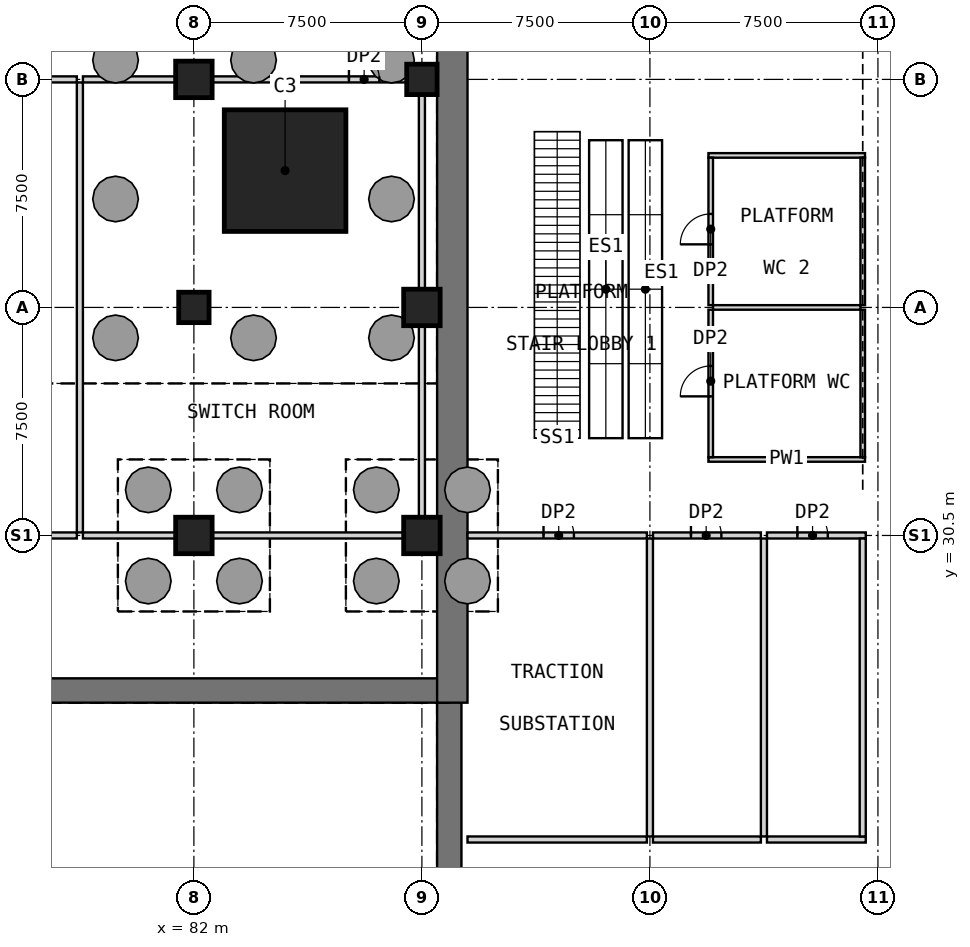
"""IFC4 building model, lengths in metres.
Left out: names, types, materials, properties, quantities, classifications, styles, units other than length and angle.
Written with IfcOpenShell. Run it as: python <this file> out.ifc"""

import sys

from ifc_helpers import new_model, si_unit, direction, frame, frame_2d, origin, origin_2d, place, context, subcontext, project, spatial, rectangle, extrude, element, fill, save


model = new_model("IFC4")
c1 = context("Model", 3, precision=1e-05, world=origin(), true_north=direction((0.0, 1.0)))
c2 = subcontext(c1, "Body", "Model", "MODEL_VIEW")
j1 = project(units=[si_unit("LENGTHUNIT", "METRE"), si_unit("PLANEANGLEUNIT", "RADIAN")], contexts=[c1])
p1 = place(None, origin())
s1 = spatial("IfcSite", under=j1, at=p1, CompositionType="ELEMENT")
p2 = place(p1, origin())
s2 = spatial("IfcBuilding", under=s1, at=p2, CompositionType="ELEMENT")
p3 = place(p2, frame((0.0, 0.0, -12.0)))
s3 = spatial("IfcBuildingStorey", under=s2, at=p3, CompositionType="ELEMENT", Elevation=-12.0)
p4 = place(p3, frame((90.4, 18.4, -0.6), z_axis=(0.0, 0.0, 1.0), x_axis=(0.0, 1.0, 0.0)))
e1 = element("IfcWall", 1, at=p4, inside=s3, PredefinedType="SHEAR", context=c2, shape_type="SweptSolid", body=[
    extrude(rectangle(XDim=7.0, YDim=0.8, at=frame_2d((3.5, 0.0))), origin(), (0.0, 0.0, 1.0), 6.6),
])
p5 = place(p3, frame((90.4, 25.4, -0.6), z_axis=(0.0, 0.0, 1.0), x_axis=(-1.0, 0.0, 0.0)))
e2 = element("IfcWall", 2, at=p5, inside=s3, PredefinedType="SHEAR", context=c2, shape_type="SweptSolid", body=[
    extrude(rectangle(XDim=80.0, YDim=0.8, at=frame_2d((40.0, 0.0))), origin(), (0.0, 0.0, 1.0), 6.6),
])
p6 = place(p3, frame((90.5, 25.0, 0.0), z_axis=(0.0, 0.0, 1.0), x_axis=(0.0, 1.0, 0.0)))
e3 = element("IfcWall", 3, at=p6, inside=s3, PredefinedType="SHEAR", context=c2, shape_type="SweptSolid", body=[
    extrude(rectangle(XDim=92.5, YDim=1.0, at=frame_2d((46.25, 0.0))), origin(), (0.0, 0.0, 1.0), 5.4),
])
p7 = place(p6, frame((23.15, 0.0, 0.0)))
e4 = element("IfcOpeningElement", 4, at=p7, cuts=e3, PredefinedType="OPENING", context=c2, shape_type="SweptSolid", body=[
    extrude(rectangle(XDim=1.5, YDim=2.1, at=frame_2d((0.75, 1.05))), frame((0.0, 0.51, 0.0), z_axis=(0.0, -1.0, 0.0), x_axis=(1.0, 0.0, 0.0)), (0.0, 0.0, 1.0), 1.02),
])
p8 = place(p6, frame((67.75, 0.0, 0.0)))
e5 = element("IfcOpeningElement", 5, at=p8, cuts=e3, PredefinedType="OPENING", context=c2, shape_type="SweptSolid", body=[
    extrude(rectangle(XDim=1.5, YDim=2.1, at=frame_2d((0.75, 1.05))), frame((0.0, 0.51, 0.0), z_axis=(0.0, -1.0, 0.0), x_axis=(1.0, 0.0, 0.0)), (0.0, 0.0, 1.0), 1.02),
])
p9 = place(p3, frame((82.0, 38.0, 0.0), z_axis=(0.0, 0.0, 1.0), x_axis=(1.0, 0.0, 0.0)))
e6 = element("IfcColumn", 6, at=p9, inside=s3, PredefinedType="COLUMN", context=c2, shape_type="SweptSolid", body=[
    extrude(rectangle(XDim=1.0, YDim=1.0, at=origin_2d()), origin(), (0.0, 0.0, 1.0), 6.0),
])
p10 = place(p3, frame((82.0, 45.5, 0.0), z_axis=(0.0, 0.0, 1.0), x_axis=(1.0, 0.0, 0.0)))
e7 = element("IfcColumn", 7, at=p10, inside=s3, PredefinedType="COLUMN", context=c2, shape_type="SweptSolid", body=[
    extrude(rectangle(XDim=1.2, YDim=1.2, at=origin_2d()), origin(), (0.0, 0.0, 1.0), 6.0),
])
p11 = place(p3, frame((89.5, 45.5, 0.0), z_axis=(0.0, 0.0, 1.0), x_axis=(1.0, 0.0, 0.0)))
e8 = element("IfcColumn", 8, at=p11, inside=s3, PredefinedType="COLUMN", context=c2, shape_type="SweptSolid", body=[
    extrude(rectangle(XDim=1.0, YDim=1.0, at=origin_2d()), origin(), (0.0, 0.0, 1.0), 6.0),
])
p12 = place(p3, frame((85.0, 42.5, 0.0), z_axis=(0.0, 0.0, 1.0), x_axis=(1.0, 0.0, 0.0)))
e9 = element("IfcColumn", 9, at=p12, inside=s3, PredefinedType="COLUMN", context=c2, shape_type="SweptSolid", body=[
    extrude(rectangle(XDim=4.0, YDim=4.0, at=origin_2d()), origin(), (0.0, 0.0, 1.0), 6.0),
])
for number, where, z_axis, x_axis in (
    (10, (82.0, 30.5, 0.0), (0.0, 0.0, 1.0), (1.0, 0.0, 0.0)),
    (11, (89.5, 30.5, 0.0), (0.0, 0.0, 1.0), (1.0, 0.0, 0.0)),
    (12, (89.5, 38.0, 0.0), (0.0, 0.0, 1.0), (1.0, 0.0, 0.0)),
):
    element("IfcColumn", number, at=place(p3, frame(where, z_axis=z_axis, x_axis=x_axis)), inside=s3, PredefinedType="COLUMN", context=c2, shape_type="SweptSolid", body=[
        extrude(rectangle(XDim=1.2, YDim=1.2, at=origin_2d()), origin(), (0.0, 0.0, 1.0), 6.0),
    ])
for number, where, z_axis, x_axis in (
    (13, (75.1, 45.5, 0.0), (0.0, 0.0, 1.0), (1.0, 0.0, 0.0)),
    (14, (78.35, 45.5, 0.0), (0.0, 0.0, 1.0), (1.0, 0.0, 0.0)),
):
    element("IfcWall", number, at=place(p3, frame(where, z_axis=z_axis, x_axis=x_axis)), inside=s3, PredefinedType="PARTITIONING", context=c2, shape_type="SweptSolid", body=[
        extrude(rectangle(XDim=3.05, YDim=0.2, at=frame_2d((1.525, 0.0))), origin(), (0.0, 0.0, 1.0), 5.4),
    ])
p13 = place(p3, frame((82.6, 45.5, 0.0), z_axis=(0.0, 0.0, 1.0), x_axis=(1.0, 0.0, 0.0)))
e15 = element("IfcWall", 15, at=p13, inside=s3, PredefinedType="PARTITIONING", context=c2, shape_type="SweptSolid", body=[
    extrude(rectangle(XDim=6.4, YDim=0.2, at=frame_2d((3.2, 0.0))), origin(), (0.0, 0.0, 1.0), 5.4),
])
p14 = place(p13, frame((4.5, 0.0, 0.0)))
e16 = element("IfcOpeningElement", 16, at=p14, cuts=e15, PredefinedType="OPENING", context=c2, shape_type="SweptSolid", body=[
    extrude(rectangle(XDim=1.0, YDim=2.1, at=frame_2d((0.5, 1.05))), frame((0.0, 0.11, 0.0), z_axis=(0.0, -1.0, 0.0), x_axis=(1.0, 0.0, 0.0)), (0.0, 0.0, 1.0), 0.22),
])
for number, where, z_axis, x_axis in (
    (17, (75.1, 30.5, 0.0), (0.0, 0.0, 1.0), (1.0, 0.0, 0.0)),
    (18, (78.35, 30.5, 0.0), (0.0, 0.0, 1.0), (1.0, 0.0, 0.0)),
):
    element("IfcWall", number, at=place(p3, frame(where, z_axis=z_axis, x_axis=x_axis)), inside=s3, PredefinedType="PARTITIONING", context=c2, shape_type="SweptSolid", body=[
        extrude(rectangle(XDim=3.05, YDim=0.2, at=frame_2d((1.525, 0.0))), origin(), (0.0, 0.0, 1.0), 5.4),
    ])
p15 = place(p3, frame((82.6, 30.5, 0.0), z_axis=(0.0, 0.0, 1.0), x_axis=(1.0, 0.0, 0.0)))
e19 = element("IfcWall", 19, at=p15, inside=s3, PredefinedType="PARTITIONING", context=c2, shape_type="SweptSolid", body=[
    extrude(rectangle(XDim=6.3, YDim=0.2, at=frame_2d((3.15, 0.0))), origin(), (0.0, 0.0, 1.0), 5.4),
])
p16 = place(p3, frame((91.0, 30.5, 0.0), z_axis=(0.0, 0.0, 1.0), x_axis=(1.0, 0.0, 0.0)))
e20 = element("IfcWall", 20, at=p16, inside=s3, PredefinedType="PARTITIONING", context=c2, shape_type="SweptSolid", body=[
    extrude(rectangle(XDim=5.9, YDim=0.2, at=frame_2d((2.95, 0.0))), origin(), (0.0, 0.0, 1.0), 5.4),
])
p17 = place(p16, frame((2.5, 0.0, 0.0)))
e21 = element("IfcOpeningElement", 21, at=p17, cuts=e20, PredefinedType="OPENING", context=c2, shape_type="SweptSolid", body=[
    extrude(rectangle(XDim=1.0, YDim=2.1, at=frame_2d((0.5, 1.05))), frame((0.0, 0.11, 0.0), z_axis=(0.0, -1.0, 0.0), x_axis=(1.0, 0.0, 0.0)), (0.0, 0.0, 1.0), 0.22),
])
p18 = place(p3, frame((97.1, 30.5, 0.0), z_axis=(0.0, 0.0, 1.0), x_axis=(1.0, 0.0, 0.0)))
e22 = element("IfcWall", 22, at=p18, inside=s3, PredefinedType="PARTITIONING", context=c2, shape_type="SweptSolid", body=[
    extrude(rectangle(XDim=3.55, YDim=0.2, at=frame_2d((1.775, 0.0))), origin(), (0.0, 0.0, 1.0), 5.4),
])
p19 = place(p18, frame((1.25, 0.0, 0.0)))
e23 = element("IfcOpeningElement", 23, at=p19, cuts=e22, PredefinedType="OPENING", context=c2, shape_type="SweptSolid", body=[
    extrude(rectangle(XDim=1.0, YDim=2.1, at=frame_2d((0.5, 1.05))), frame((0.0, 0.11, 0.0), z_axis=(0.0, -1.0, 0.0), x_axis=(1.0, 0.0, 0.0)), (0.0, 0.0, 1.0), 0.22),
])
p20 = place(p3, frame((100.85, 30.5, 0.0), z_axis=(0.0, 0.0, 1.0), x_axis=(1.0, 0.0, 0.0)))
e24 = element("IfcWall", 24, at=p20, inside=s3, PredefinedType="PARTITIONING", context=c2, shape_type="SweptSolid", body=[
    extrude(rectangle(XDim=3.25, YDim=0.2, at=frame_2d((1.625, 0.0))), origin(), (0.0, 0.0, 1.0), 5.4),
])
p21 = place(p20, frame((1.0, 0.0, 0.0)))
e25 = element("IfcOpeningElement", 25, at=p21, cuts=e24, PredefinedType="OPENING", context=c2, shape_type="SweptSolid", body=[
    extrude(rectangle(XDim=1.0, YDim=2.1, at=frame_2d((0.5, 1.05))), frame((0.0, 0.11, 0.0), z_axis=(0.0, -1.0, 0.0), x_axis=(1.0, 0.0, 0.0)), (0.0, 0.0, 1.0), 0.22),
])
p22 = place(p3, frame((98.925, 33.0, 0.0), z_axis=(0.0, 0.0, 1.0), x_axis=(1.0, 0.0, 0.0)))
e26 = element("IfcWall", 26, at=p22, inside=s3, PredefinedType="PARTITIONING", context=c2, shape_type="SweptSolid", body=[
    extrude(rectangle(XDim=5.15, YDim=0.15, at=frame_2d((2.575, 0.0))), origin(), (0.0, 0.0, 1.0), 5.4),
])
p23 = place(p3, frame((99.075, 38.0, 0.0), z_axis=(0.0, 0.0, 1.0), x_axis=(1.0, 0.0, 0.0)))
e27 = element("IfcWall", 27, at=p23, inside=s3, PredefinedType="PARTITIONING", context=c2, shape_type="SweptSolid", body=[
    extrude(rectangle(XDim=4.85, YDim=0.15, at=frame_2d((2.425, 0.0))), origin(), (0.0, 0.0, 1.0), 5.4),
])
p24 = place(p3, frame((98.925, 43.0, 0.0), z_axis=(0.0, 0.0, 1.0), x_axis=(1.0, 0.0, 0.0)))
e28 = element("IfcWall", 28, at=p24, inside=s3, PredefinedType="PARTITIONING", context=c2, shape_type="SweptSolid", body=[
    extrude(rectangle(XDim=5.15, YDim=0.15, at=frame_2d((2.575, 0.0))), origin(), (0.0, 0.0, 1.0), 5.4),
])
p25 = place(p3, frame((91.0, 20.5, 0.0), z_axis=(0.0, 0.0, 1.0), x_axis=(1.0, 0.0, 0.0)))
e29 = element("IfcWall", 29, at=p25, inside=s3, PredefinedType="PARTITIONING", context=c2, shape_type="SweptSolid", body=[
    extrude(rectangle(XDim=5.9, YDim=0.2, at=frame_2d((2.95, 0.0))), origin(), (0.0, 0.0, 1.0), 5.4),
])
p26 = place(p3, frame((97.1, 20.5, 0.0), z_axis=(0.0, 0.0, 1.0), x_axis=(1.0, 0.0, 0.0)))
e30 = element("IfcWall", 30, at=p26, inside=s3, PredefinedType="PARTITIONING", context=c2, shape_type="SweptSolid", body=[
    extrude(rectangle(XDim=3.55, YDim=0.2, at=frame_2d((1.775, 0.0))), origin(), (0.0, 0.0, 1.0), 5.4),
])
p27 = place(p3, frame((100.85, 20.5, 0.0), z_axis=(0.0, 0.0, 1.0), x_axis=(1.0, 0.0, 0.0)))
e31 = element("IfcWall", 31, at=p27, inside=s3, PredefinedType="PARTITIONING", context=c2, shape_type="SweptSolid", body=[
    extrude(rectangle(XDim=3.25, YDim=0.2, at=frame_2d((1.625, 0.0))), origin(), (0.0, 0.0, 1.0), 5.4),
])
p28 = place(p3, frame((89.5, 31.1, 0.0), z_axis=(0.0, 0.0, 1.0), x_axis=(0.0, 1.0, 0.0)))
e32 = element("IfcWall", 32, at=p28, inside=s3, PredefinedType="PARTITIONING", context=c2, shape_type="SweptSolid", body=[
    extrude(rectangle(XDim=6.3, YDim=0.2, at=frame_2d((3.15, 0.0))), origin(), (0.0, 0.0, 1.0), 5.4),
])
p29 = place(p3, frame((89.5, 38.6, 0.0), z_axis=(0.0, 0.0, 1.0), x_axis=(0.0, 1.0, 0.0)))
e33 = element("IfcWall", 33, at=p29, inside=s3, PredefinedType="PARTITIONING", context=c2, shape_type="SweptSolid", body=[
    extrude(rectangle(XDim=6.4, YDim=0.2, at=frame_2d((3.2, 0.0))), origin(), (0.0, 0.0, 1.0), 5.4),
])
p30 = place(p3, frame((78.25, 30.6, 0.0), z_axis=(0.0, 0.0, 1.0), x_axis=(0.0, 1.0, 0.0)))
e34 = element("IfcWall", 34, at=p30, inside=s3, PredefinedType="PARTITIONING", context=c2, shape_type="SweptSolid", body=[
    extrude(rectangle(XDim=14.8, YDim=0.2, at=frame_2d((7.4, 0.0))), origin(), (0.0, 0.0, 1.0), 5.4),
])
p31 = place(p3, frame((99.0, 33.075, 0.0), z_axis=(0.0, 0.0, 1.0), x_axis=(0.0, 1.0, 0.0)))
e35 = element("IfcWall", 35, at=p31, inside=s3, PredefinedType="PARTITIONING", context=c2, shape_type="SweptSolid", body=[
    extrude(rectangle(XDim=4.85, YDim=0.15, at=frame_2d((2.425, 0.0))), origin(), (0.0, 0.0, 1.0), 5.4),
])
p32 = place(p31, frame((2.0, 0.0, 0.0)))
e36 = element("IfcOpeningElement", 36, at=p32, cuts=e35, PredefinedType="OPENING", context=c2, shape_type="SweptSolid", body=[
    extrude(rectangle(XDim=1.0, YDim=2.1, at=frame_2d((0.5, 1.05))), frame((0.0, 0.085, 0.0), z_axis=(0.0, -1.0, 0.0), x_axis=(1.0, 0.0, 0.0)), (0.0, 0.0, 1.0), 0.17),
])
p33 = place(p3, frame((99.0, 38.075, 0.0), z_axis=(0.0, 0.0, 1.0), x_axis=(0.0, 1.0, 0.0)))
e37 = element("IfcWall", 37, at=p33, inside=s3, PredefinedType="PARTITIONING", context=c2, shape_type="SweptSolid", body=[
    extrude(rectangle(XDim=4.85, YDim=0.15, at=frame_2d((2.425, 0.0))), origin(), (0.0, 0.0, 1.0), 5.4),
])
p34 = place(p33, frame((2.0, 0.0, 0.0)))
e38 = element("IfcOpeningElement", 38, at=p34, cuts=e37, PredefinedType="OPENING", context=c2, shape_type="SweptSolid", body=[
    extrude(rectangle(XDim=1.0, YDim=2.1, at=frame_2d((0.5, 1.05))), frame((0.0, 0.085, 0.0), z_axis=(0.0, -1.0, 0.0), x_axis=(1.0, 0.0, 0.0)), (0.0, 0.0, 1.0), 0.17),
])
p35 = place(p3, frame((104.0, 20.6, 0.0), z_axis=(0.0, 0.0, 1.0), x_axis=(0.0, 1.0, 0.0)))
e39 = element("IfcWall", 39, at=p35, inside=s3, PredefinedType="PARTITIONING", context=c2, shape_type="SweptSolid", body=[
    extrude(rectangle(XDim=9.8, YDim=0.2, at=frame_2d((4.9, 0.0))), origin(), (0.0, 0.0, 1.0), 5.4),
])
for number, where, z_axis, x_axis in (
    (40, (104.0, 33.075, 0.0), (0.0, 0.0, 1.0), (0.0, 1.0, 0.0)),
    (41, (104.0, 38.075, 0.0), (0.0, 0.0, 1.0), (0.0, 1.0, 0.0)),
):
    element("IfcWall", number, at=place(p3, frame(where, z_axis=z_axis, x_axis=x_axis)), inside=s3, PredefinedType="PARTITIONING", context=c2, shape_type="SweptSolid", body=[
        extrude(rectangle(XDim=4.85, YDim=0.15, at=frame_2d((2.425, 0.0))), origin(), (0.0, 0.0, 1.0), 5.4),
    ])
for number, where, z_axis, x_axis in (
    (42, (97.0, 20.6, 0.0), (0.0, 0.0, 1.0), (0.0, 1.0, 0.0)),
    (43, (100.75, 20.6, 0.0), (0.0, 0.0, 1.0), (0.0, 1.0, 0.0)),
):
    element("IfcWall", number, at=place(p3, frame(where, z_axis=z_axis, x_axis=x_axis)), inside=s3, PredefinedType="PARTITIONING", context=c2, shape_type="SweptSolid", body=[
        extrude(rectangle(XDim=9.8, YDim=0.2, at=frame_2d((4.9, 0.0))), origin(), (0.0, 0.0, 1.0), 5.4),
    ])
p36 = place(p14, origin())
e44 = element("IfcDoor", 44, at=p36, inside=s3, OperationType="SINGLE_SWING_LEFT", PredefinedType="DOOR", context=c2, shape_type="SweptSolid", body=[
    extrude(rectangle(XDim=1.0, YDim=2.1, at=frame_2d((0.5, 1.05))), frame((0.0, 0.025, 0.0), z_axis=(0.0, -1.0, 0.0), x_axis=(1.0, 0.0, 0.0)), (0.0, 0.0, 1.0), 0.05),
])
fill(e16, e44)
p37 = place(p17, origin())
e45 = element("IfcDoor", 45, at=p37, inside=s3, OperationType="SINGLE_SWING_LEFT", PredefinedType="DOOR", context=c2, shape_type="SweptSolid", body=[
    extrude(rectangle(XDim=1.0, YDim=2.1, at=frame_2d((0.5, 1.05))), frame((0.0, 0.025, 0.0), z_axis=(0.0, -1.0, 0.0), x_axis=(1.0, 0.0, 0.0)), (0.0, 0.0, 1.0), 0.05),
])
fill(e21, e45)
p38 = place(p19, origin())
e46 = element("IfcDoor", 46, at=p38, inside=s3, OperationType="SINGLE_SWING_LEFT", PredefinedType="DOOR", context=c2, shape_type="SweptSolid", body=[
    extrude(rectangle(XDim=1.0, YDim=2.1, at=frame_2d((0.5, 1.05))), frame((0.0, 0.025, 0.0), z_axis=(0.0, -1.0, 0.0), x_axis=(1.0, 0.0, 0.0)), (0.0, 0.0, 1.0), 0.05),
])
fill(e23, e46)
p39 = place(p21, origin())
e47 = element("IfcDoor", 47, at=p39, inside=s3, OperationType="SINGLE_SWING_LEFT", PredefinedType="DOOR", context=c2, shape_type="SweptSolid", body=[
    extrude(rectangle(XDim=1.0, YDim=2.1, at=frame_2d((0.5, 1.05))), frame((0.0, 0.025, 0.0), z_axis=(0.0, -1.0, 0.0), x_axis=(1.0, 0.0, 0.0)), (0.0, 0.0, 1.0), 0.05),
])
fill(e25, e47)
p40 = place(p32, origin())
e48 = element("IfcDoor", 48, at=p40, inside=s3, OperationType="SINGLE_SWING_LEFT", PredefinedType="DOOR", context=c2, shape_type="SweptSolid", body=[
    extrude(rectangle(XDim=1.0, YDim=2.1, at=frame_2d((0.5, 1.05))), frame((0.0, 0.025, 0.0), z_axis=(0.0, -1.0, 0.0), x_axis=(1.0, 0.0, 0.0)), (0.0, 0.0, 1.0), 0.05),
])
fill(e36, e48)
p41 = place(p34, origin())
e49 = element("IfcDoor", 49, at=p41, inside=s3, OperationType="SINGLE_SWING_LEFT", PredefinedType="DOOR", context=c2, shape_type="SweptSolid", body=[
    extrude(rectangle(XDim=1.0, YDim=2.1, at=frame_2d((0.5, 1.05))), frame((0.0, 0.025, 0.0), z_axis=(0.0, -1.0, 0.0), x_axis=(1.0, 0.0, 0.0)), (0.0, 0.0, 1.0), 0.05),
])
fill(e38, e49)
save(model, sys.argv[1])
